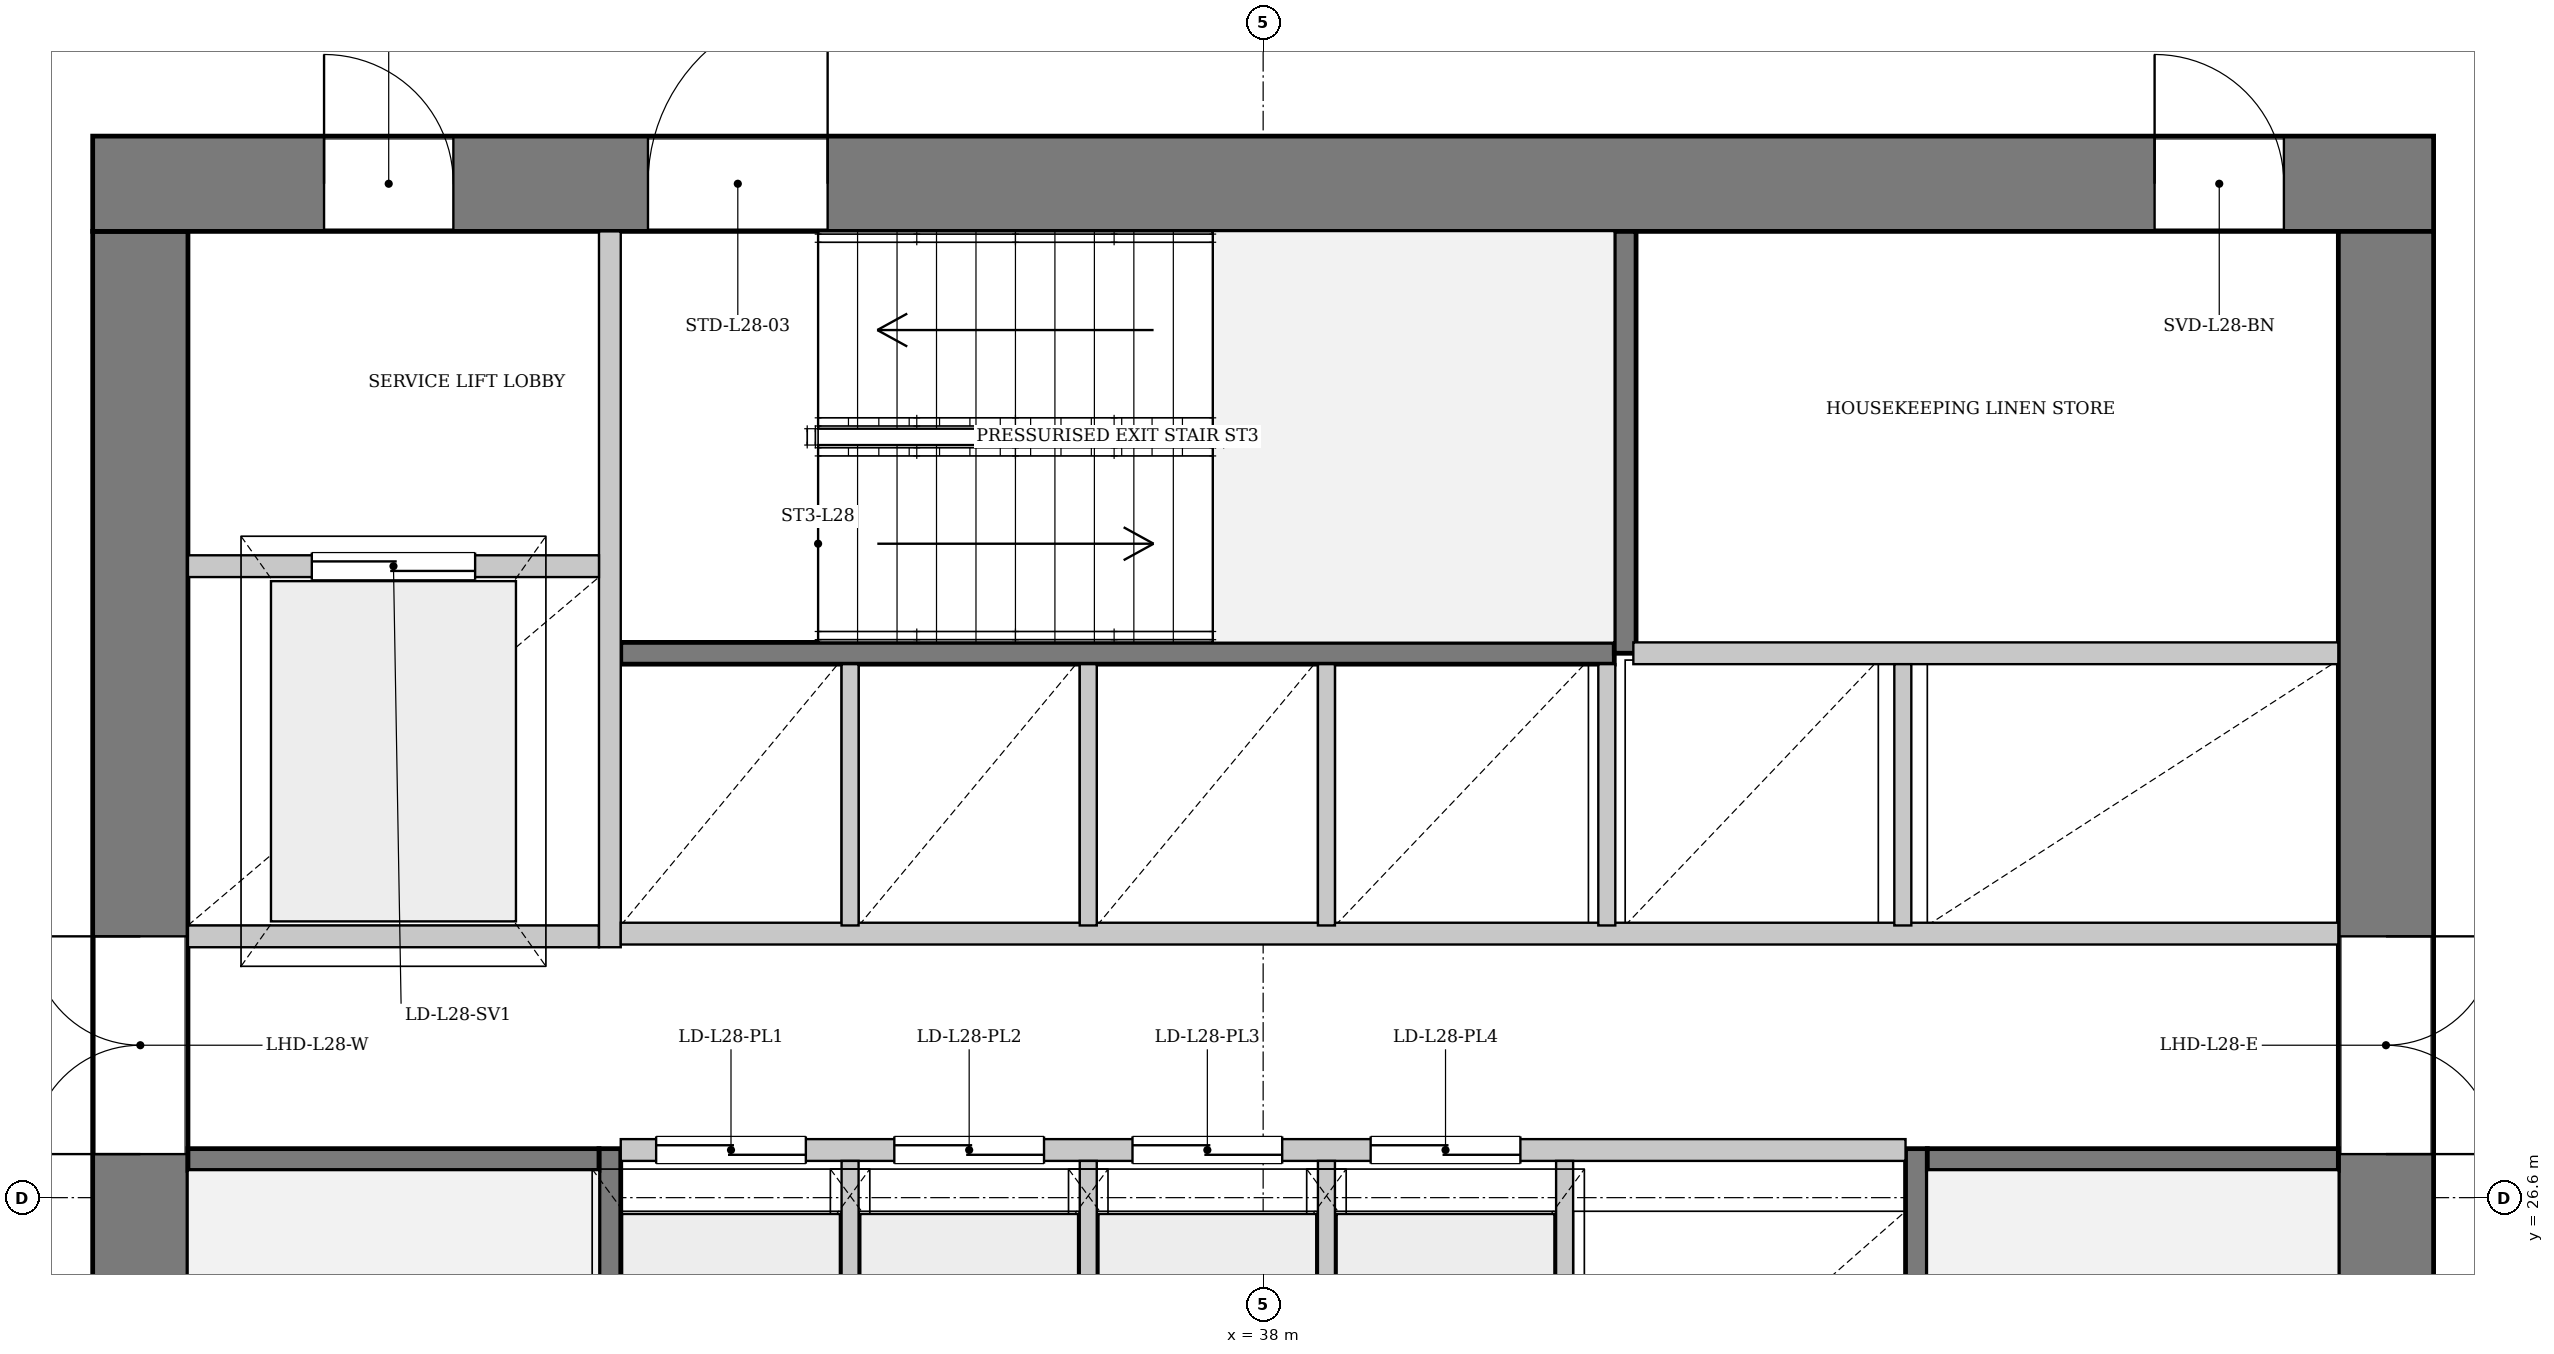
"""IFC4 building model, lengths in metres.
Left out: names, types, materials, properties, quantities, classifications, styles, units other than length and angle.
Written with IfcOpenShell. Run it as: python <this file> out.ifc"""

import sys

from ifc_helpers import new_model, si_unit, direction, frame, frame_2d, origin, place, context, subcontext, project, spatial, rectangle, extrude, source, transform, mapped, element, fill, save


model = new_model("IFC4")
c1 = context("Model", 3, precision=1e-05, world=origin(), true_north=direction((0.0, 1.0)))
c2 = subcontext(c1, "Body", "Model", "MODEL_VIEW")
j1 = project(units=[si_unit("LENGTHUNIT", "METRE"), si_unit("PLANEANGLEUNIT", "RADIAN")], contexts=[c1])
p1 = place(None, origin())
s1 = spatial("IfcSite", under=j1, at=p1, CompositionType="ELEMENT")
p2 = place(p1, origin())
s2 = spatial("IfcBuilding", under=s1, at=p2, CompositionType="ELEMENT")
p3 = place(p2, frame((0.0, 0.0, 109.25)))
s3 = spatial("IfcBuildingStorey", under=s2, at=p3, CompositionType="ELEMENT", Elevation=109.25)
p4 = place(p3, frame((29.75, 19.5, 0.0), z_axis=(0.0, 0.0, 1.0), x_axis=(0.0, 1.0, 0.0)))
e1 = element("IfcWall", 1, at=p4, inside=s3, PredefinedType="SHEAR", context=c2, shape_type="SweptSolid", body=[
    extrude(rectangle(XDim=14.2, YDim=0.7, at=frame_2d((7.1, 0.0))), origin(), (0.0, 0.0, 1.0), 3.3),
])
p5 = place(p4, frame((7.42, 0.0, 0.0)))
e2 = element("IfcOpeningElement", 2, at=p5, cuts=e1, PredefinedType="OPENING", context=c2, shape_type="SweptSolid", body=[
    extrude(rectangle(XDim=1.6, YDim=2.2, at=frame_2d((0.8, 1.1))), frame((0.0, 0.36, 0.0), z_axis=(0.0, -1.0, 0.0), x_axis=(1.0, 0.0, 0.0)), (0.0, 0.0, 1.0), 0.72),
])
p6 = place(p3, frame((29.4, 34.05, 0.0), z_axis=(0.0, 0.0, 1.0), x_axis=(1.0, 0.0, 0.0)))
e3 = element("IfcWall", 3, at=p6, inside=s3, PredefinedType="SHEAR", context=c2, shape_type="SweptSolid", body=[
    extrude(rectangle(XDim=17.2, YDim=0.7, at=frame_2d((8.6, 0.0))), origin(), (0.0, 0.0, 1.0), 3.3),
])
p7 = place(p6, frame((1.7, 0.0, 0.0)))
e4 = element("IfcOpeningElement", 4, at=p7, cuts=e3, PredefinedType="OPENING", context=c2, shape_type="SweptSolid", body=[
    extrude(rectangle(XDim=0.95, YDim=2.1, at=frame_2d((0.475, 1.05))), frame((0.0, 0.36, 0.0), z_axis=(0.0, -1.0, 0.0), x_axis=(1.0, 0.0, 0.0)), (0.0, 0.0, 1.0), 0.72),
])
p8 = place(p6, frame((4.08, 0.0, 0.0)))
e5 = element("IfcOpeningElement", 5, at=p8, cuts=e3, PredefinedType="OPENING", context=c2, shape_type="SweptSolid", body=[
    extrude(rectangle(XDim=1.32, YDim=2.2, at=frame_2d((0.66, 1.1))), frame((0.0, 0.36, 0.0), z_axis=(0.0, -1.0, 0.0), x_axis=(1.0, 0.0, 0.0)), (0.0, 0.0, 1.0), 0.72),
])
p9 = place(p6, frame((15.15, 0.0, 0.0)))
e6 = element("IfcOpeningElement", 6, at=p9, cuts=e3, PredefinedType="OPENING", context=c2, shape_type="SweptSolid", body=[
    extrude(rectangle(XDim=0.95, YDim=2.1, at=frame_2d((0.475, 1.05))), frame((0.0, 0.36, 0.0), z_axis=(0.0, -1.0, 0.0), x_axis=(1.0, 0.0, 0.0)), (0.0, 0.0, 1.0), 0.72),
])
p10 = place(p3, frame((46.25, 33.7, 0.0), z_axis=(0.0, 0.0, 1.0), x_axis=(0.0, -1.0, 0.0)))
e7 = element("IfcWall", 7, at=p10, inside=s3, PredefinedType="SHEAR", context=c2, shape_type="SweptSolid", body=[
    extrude(rectangle(XDim=14.2, YDim=0.7, at=frame_2d((7.1, 0.0))), origin(), (0.0, 0.0, 1.0), 3.3),
])
p11 = place(p10, frame((5.18, 0.0, 0.0)))
e8 = element("IfcOpeningElement", 8, at=p11, cuts=e7, PredefinedType="OPENING", context=c2, shape_type="SweptSolid", body=[
    extrude(rectangle(XDim=1.6, YDim=2.2, at=frame_2d((0.8, 1.1))), frame((0.0, 0.36, 0.0), z_axis=(0.0, -1.0, 0.0), x_axis=(1.0, 0.0, 0.0)), (0.0, 0.0, 1.0), 0.72),
])
p12 = place(p3, frame((33.2, 19.5, 0.0), z_axis=(0.0, 0.0, 1.0), x_axis=(0.0, 1.0, 0.0)))
e9 = element("IfcWall", 9, at=p12, inside=s3, PredefinedType="PARTITIONING", context=c2, shape_type="SweptSolid", body=[
    extrude(rectangle(XDim=7.46, YDim=0.16, at=frame_2d((3.73, 0.0))), origin(), (0.0, 0.0, 1.0), 3.3),
])
p13 = place(p12, frame((0.08, 0.0, 0.0)))
e10 = element("IfcOpeningElement", 10, at=p13, cuts=e9, PredefinedType="OPENING", context=c2, shape_type="SweptSolid", body=[
    extrude(rectangle(XDim=1.32, YDim=2.2, at=frame_2d((0.66, 1.1))), frame((0.0, 0.09, 0.0), z_axis=(0.0, -1.0, 0.0), x_axis=(1.0, 0.0, 0.0)), (0.0, 0.0, 1.0), 0.18),
])
p14 = place(p3, frame((30.1, 26.88, 0.0), z_axis=(0.0, 0.0, 1.0), x_axis=(1.0, 0.0, 0.0)))
e11 = element("IfcWall", 11, at=p14, inside=s3, PredefinedType="PARTITIONING", context=c2, shape_type="SweptSolid", body=[
    extrude(rectangle(XDim=3.02, YDim=0.16, at=frame_2d((1.51, 0.0))), origin(), (0.0, 0.0, 1.0), 3.3),
])
p15 = place(p3, frame((42.8, 26.96, 0.0), z_axis=(0.0, 0.0, 1.0), x_axis=(0.0, -1.0, 0.0)))
e12 = element("IfcWall", 12, at=p15, inside=s3, PredefinedType="PARTITIONING", context=c2, shape_type="SweptSolid", body=[
    extrude(rectangle(XDim=7.46, YDim=0.16, at=frame_2d((3.73, 0.0))), origin(), (0.0, 0.0, 1.0), 3.3),
])
p16 = place(p15, frame((6.06, 0.0, 0.0)))
e13 = element("IfcOpeningElement", 13, at=p16, cuts=e12, PredefinedType="OPENING", context=c2, shape_type="SweptSolid", body=[
    extrude(rectangle(XDim=1.32, YDim=2.2, at=frame_2d((0.66, 1.1))), frame((0.0, 0.09, 0.0), z_axis=(0.0, -1.0, 0.0), x_axis=(1.0, 0.0, 0.0)), (0.0, 0.0, 1.0), 0.18),
])
p17 = place(p3, frame((42.88, 26.88, 0.0), z_axis=(0.0, 0.0, 1.0), x_axis=(1.0, 0.0, 0.0)))
e14 = element("IfcWall", 14, at=p17, inside=s3, PredefinedType="PARTITIONING", context=c2, shape_type="SweptSolid", body=[
    extrude(rectangle(XDim=3.02, YDim=0.16, at=frame_2d((1.51, 0.0))), origin(), (0.0, 0.0, 1.0), 3.3),
])
p18 = place(p3, frame((33.28, 30.6, 0.0), z_axis=(0.0, 0.0, 1.0), x_axis=(1.0, 0.0, 0.0)))
e15 = element("IfcWall", 15, at=p18, inside=s3, PredefinedType="PARTITIONING", context=c2, shape_type="SweptSolid", body=[
    extrude(rectangle(XDim=7.3, YDim=0.16, at=frame_2d((3.65, 0.0))), origin(), (0.0, 0.0, 1.0), 3.3),
])
p19 = place(p3, frame((40.66, 30.6, 0.0), z_axis=(0.0, 0.0, 1.0), x_axis=(0.0, 1.0, 0.0)))
e16 = element("IfcWall", 16, at=p19, inside=s3, PredefinedType="PARTITIONING", context=c2, shape_type="SweptSolid", body=[
    extrude(rectangle(XDim=3.1, YDim=0.16, at=frame_2d((1.55, 0.0))), origin(), (0.0, 0.0, 1.0), 3.3),
])
p20 = place(p3, frame((30.1, 28.52, 0.0), z_axis=(0.0, 0.0, 1.0), x_axis=(1.0, 0.0, 0.0)))
e17 = element("IfcWall", 17, at=p20, inside=s3, PredefinedType="PARTITIONING", context=c2, shape_type="SweptSolid", body=[
    extrude(rectangle(XDim=3.02, YDim=0.16, at=frame_2d((1.51, 0.0))), origin(), (0.0, 0.0, 1.0), 3.3),
])
p21 = place(p3, frame((33.2, 28.44, 0.0), z_axis=(0.0, 0.0, 1.0), x_axis=(0.0, 1.0, 0.0)))
e18 = element("IfcWall", 18, at=p21, inside=s3, PredefinedType="PARTITIONING", context=c2, shape_type="SweptSolid", body=[
    extrude(rectangle(XDim=5.26, YDim=0.16, at=frame_2d((2.63, 0.0))), origin(), (0.0, 0.0, 1.0), 3.3),
])
p22 = place(p3, frame((30.1, 31.24, 0.0), z_axis=(0.0, 0.0, 1.0), x_axis=(1.0, 0.0, 0.0)))
e19 = element("IfcWall", 19, at=p22, inside=s3, PredefinedType="PARTITIONING", context=c2, shape_type="SweptSolid", body=[
    extrude(rectangle(XDim=3.02, YDim=0.16, at=frame_2d((1.51, 0.0))), origin(), (0.0, 0.0, 1.0), 3.3),
])
p23 = place(p22, frame((0.91, 0.0, 0.0)))
e20 = element("IfcOpeningElement", 20, at=p23, cuts=e19, PredefinedType="OPENING", context=c2, shape_type="SweptSolid", body=[
    extrude(rectangle(XDim=1.2, YDim=2.2, at=frame_2d((0.6, 1.1))), frame((0.0, 0.09, 0.0), z_axis=(0.0, -1.0, 0.0), x_axis=(1.0, 0.0, 0.0)), (0.0, 0.0, 1.0), 0.18),
])
p24 = place(p3, frame((33.28, 26.95, 0.0), z_axis=(0.0, 0.0, 1.0), x_axis=(1.0, 0.0, 0.0)))
e21 = element("IfcWall", 21, at=p24, inside=s3, PredefinedType="PARTITIONING", context=c2, shape_type="SweptSolid", body=[
    extrude(rectangle(XDim=9.44, YDim=0.16, at=frame_2d((4.72, 0.0))), origin(), (0.0, 0.0, 1.0), 3.3),
])
p25 = place(p24, frame((0.26, 0.0, 0.0)))
e22 = element("IfcOpeningElement", 22, at=p25, cuts=e21, PredefinedType="OPENING", context=c2, shape_type="SweptSolid", body=[
    extrude(rectangle(XDim=1.1, YDim=2.2, at=frame_2d((0.55, 1.1))), frame((0.0, 0.09, 0.0), z_axis=(0.0, -1.0, 0.0), x_axis=(1.0, 0.0, 0.0)), (0.0, 0.0, 1.0), 0.18),
])
p26 = place(p24, frame((2.01, 0.0, 0.0)))
e23 = element("IfcOpeningElement", 23, at=p26, cuts=e21, PredefinedType="OPENING", context=c2, shape_type="SweptSolid", body=[
    extrude(rectangle(XDim=1.1, YDim=2.2, at=frame_2d((0.55, 1.1))), frame((0.0, 0.09, 0.0), z_axis=(0.0, -1.0, 0.0), x_axis=(1.0, 0.0, 0.0)), (0.0, 0.0, 1.0), 0.18),
])
p27 = place(p24, frame((3.76, 0.0, 0.0)))
e24 = element("IfcOpeningElement", 24, at=p27, cuts=e21, PredefinedType="OPENING", context=c2, shape_type="SweptSolid", body=[
    extrude(rectangle(XDim=1.1, YDim=2.2, at=frame_2d((0.55, 1.1))), frame((0.0, 0.09, 0.0), z_axis=(0.0, -1.0, 0.0), x_axis=(1.0, 0.0, 0.0)), (0.0, 0.0, 1.0), 0.18),
])
p28 = place(p24, frame((5.51, 0.0, 0.0)))
e25 = element("IfcOpeningElement", 25, at=p28, cuts=e21, PredefinedType="OPENING", context=c2, shape_type="SweptSolid", body=[
    extrude(rectangle(XDim=1.1, YDim=2.2, at=frame_2d((0.55, 1.1))), frame((0.0, 0.09, 0.0), z_axis=(0.0, -1.0, 0.0), x_axis=(1.0, 0.0, 0.0)), (0.0, 0.0, 1.0), 0.18),
])
for number, where, z_axis, x_axis in (
    (26, (34.965, 24.56, 0.0), (0.0, 0.0, 1.0), (0.0, 1.0, 0.0)),
    (27, (36.715, 24.56, 0.0), (0.0, 0.0, 1.0), (0.0, 1.0, 0.0)),
    (28, (38.465, 24.56, 0.0), (0.0, 0.0, 1.0), (0.0, 1.0, 0.0)),
    (29, (40.215, 24.56, 0.0), (0.0, 0.0, 1.0), (0.0, 1.0, 0.0)),
):
    element("IfcWall", number, at=place(p3, frame(where, z_axis=z_axis, x_axis=x_axis)), inside=s3, PredefinedType="PARTITIONING", context=c2, shape_type="SweptSolid", body=[
        extrude(rectangle(XDim=2.31, YDim=0.125, at=frame_2d((1.155, 0.0))), origin(), (0.0, 0.0, 1.0), 3.3),
    ])
p29 = place(p3, frame((33.28, 28.54, 0.0), z_axis=(0.0, 0.0, 1.0), x_axis=(1.0, 0.0, 0.0)))
e30 = element("IfcWall", 30, at=p29, inside=s3, PredefinedType="PARTITIONING", context=c2, shape_type="SweptSolid", body=[
    extrude(rectangle(XDim=12.62, YDim=0.16, at=frame_2d((6.31, 0.0))), origin(), (0.0, 0.0, 1.0), 3.3),
])
p30 = place(p3, frame((40.72, 30.6, 0.0), z_axis=(0.0, 0.0, 1.0), x_axis=(1.0, 0.0, 0.0)))
e31 = element("IfcWall", 31, at=p30, inside=s3, PredefinedType="PARTITIONING", context=c2, shape_type="SweptSolid", body=[
    extrude(rectangle(XDim=5.18, YDim=0.16, at=frame_2d((2.59, 0.0))), origin(), (0.0, 0.0, 1.0), 3.3),
])
for number, where, z_axis, x_axis in (
    (32, (34.965, 28.6, 0.0), (0.0, 0.0, 1.0), (0.0, 1.0, 0.0)),
    (33, (36.715, 28.6, 0.0), (0.0, 0.0, 1.0), (0.0, 1.0, 0.0)),
    (34, (38.465, 28.6, 0.0), (0.0, 0.0, 1.0), (0.0, 1.0, 0.0)),
    (35, (40.525, 28.6, 0.0), (0.0, 0.0, 1.0), (0.0, 1.0, 0.0)),
    (36, (42.7, 28.6, 0.0), (0.0, 0.0, 1.0), (0.0, 1.0, 0.0)),
):
    element("IfcWall", number, at=place(p3, frame(where, z_axis=z_axis, x_axis=x_axis)), inside=s3, PredefinedType="PARTITIONING", context=c2, shape_type="SweptSolid", body=[
        extrude(rectangle(XDim=1.92, YDim=0.125, at=frame_2d((0.96, 0.0))), origin(), (0.0, 0.0, 1.0), 3.3),
    ])
m1 = source(origin(), c2, "Body", "SweptSolid", [
    extrude(rectangle(XDim=1.6, YDim=2.2, at=frame_2d((0.8, 1.1))), frame((0.0, 0.025, 0.0), z_axis=(0.0, -1.0, 0.0), x_axis=(1.0, 0.0, 0.0)), (0.0, 0.0, 1.0), 0.05),
])
p31 = place(p5, origin())
e37 = element("IfcDoor", 37, at=p31, inside=s3, OperationType="DOUBLE_DOOR_SINGLE_SWING", PredefinedType="DOOR", context=c2, shape_type="MappedRepresentation", body=[
    mapped(m1, transform((0.0, 0.0, 0.0), x_axis=(1.0, 0.0, 0.0), y_axis=(0.0, 1.0, 0.0), z_axis=(0.0, 0.0, 1.0), scale=1.0)),
])
fill(e2, e37)
m2 = source(origin(), c2, "Body", "SweptSolid", [
    extrude(rectangle(XDim=0.95, YDim=2.1, at=frame_2d((0.475, 1.05))), frame((0.0, 0.025, 0.0), z_axis=(0.0, -1.0, 0.0), x_axis=(1.0, 0.0, 0.0)), (0.0, 0.0, 1.0), 0.05),
])
p32 = place(p7, origin())
e38 = element("IfcDoor", 38, at=p32, inside=s3, OperationType="SINGLE_SWING_LEFT", PredefinedType="DOOR", context=c2, shape_type="MappedRepresentation", body=[
    mapped(m2, transform((0.0, 0.0, 0.0), x_axis=(1.0, 0.0, 0.0), y_axis=(0.0, 1.0, 0.0), z_axis=(0.0, 0.0, 1.0), scale=1.0)),
])
fill(e4, e38)
m3 = source(origin(), c2, "Body", "SweptSolid", [
    extrude(rectangle(XDim=1.32, YDim=2.2, at=frame_2d((0.66, 1.1))), frame((0.0, 0.025, 0.0), z_axis=(0.0, -1.0, 0.0), x_axis=(1.0, 0.0, 0.0)), (0.0, 0.0, 1.0), 0.05),
])
p33 = place(p8, origin())
e39 = element("IfcDoor", 39, at=p33, inside=s3, OperationType="SINGLE_SWING_RIGHT", PredefinedType="DOOR", context=c2, shape_type="MappedRepresentation", body=[
    mapped(m3, transform((0.0, 0.0, 0.0), x_axis=(1.0, 0.0, 0.0), y_axis=(0.0, 1.0, 0.0), z_axis=(0.0, 0.0, 1.0), scale=1.0)),
])
fill(e5, e39)
p34 = place(p11, origin())
e40 = element("IfcDoor", 40, at=p34, inside=s3, OperationType="DOUBLE_DOOR_SINGLE_SWING", PredefinedType="DOOR", context=c2, shape_type="MappedRepresentation", body=[
    mapped(m1, transform((0.0, 0.0, 0.0), x_axis=(1.0, 0.0, 0.0), y_axis=(0.0, 1.0, 0.0), z_axis=(0.0, 0.0, 1.0), scale=1.0)),
])
fill(e8, e40)
m4 = source(origin(), c2, "Body", "SweptSolid", [
    extrude(rectangle(XDim=1.2, YDim=2.2, at=frame_2d((0.6, 1.1))), frame((0.0, 0.025, 0.0), z_axis=(0.0, -1.0, 0.0), x_axis=(1.0, 0.0, 0.0)), (0.0, 0.0, 1.0), 0.05),
])
p35 = place(p23, origin())
e41 = element("IfcDoor", 41, at=p35, inside=s3, OperationType="DOUBLE_DOOR_SLIDING", PredefinedType="DOOR", context=c2, shape_type="MappedRepresentation", body=[
    mapped(m4, transform((0.0, 0.0, 0.0), x_axis=(1.0, 0.0, 0.0), y_axis=(0.0, 1.0, 0.0), z_axis=(0.0, 0.0, 1.0), scale=1.0)),
])
fill(e20, e41)
m5 = source(origin(), c2, "Body", "SweptSolid", [
    extrude(rectangle(XDim=1.1, YDim=2.2, at=frame_2d((0.55, 1.1))), frame((0.0, 0.025, 0.0), z_axis=(0.0, -1.0, 0.0), x_axis=(1.0, 0.0, 0.0)), (0.0, 0.0, 1.0), 0.05),
])
p36 = place(p25, origin())
e42 = element("IfcDoor", 42, at=p36, inside=s3, OperationType="DOUBLE_DOOR_SLIDING", PredefinedType="DOOR", context=c2, shape_type="MappedRepresentation", body=[
    mapped(m5, transform((0.0, 0.0, 0.0), x_axis=(1.0, 0.0, 0.0), y_axis=(0.0, 1.0, 0.0), z_axis=(0.0, 0.0, 1.0), scale=1.0)),
])
fill(e22, e42)
p37 = place(p26, origin())
e43 = element("IfcDoor", 43, at=p37, inside=s3, OperationType="DOUBLE_DOOR_SLIDING", PredefinedType="DOOR", context=c2, shape_type="MappedRepresentation", body=[
    mapped(m5, transform((0.0, 0.0, 0.0), x_axis=(1.0, 0.0, 0.0), y_axis=(0.0, 1.0, 0.0), z_axis=(0.0, 0.0, 1.0), scale=1.0)),
])
fill(e23, e43)
p38 = place(p27, origin())
e44 = element("IfcDoor", 44, at=p38, inside=s3, OperationType="DOUBLE_DOOR_SLIDING", PredefinedType="DOOR", context=c2, shape_type="MappedRepresentation", body=[
    mapped(m5, transform((0.0, 0.0, 0.0), x_axis=(1.0, 0.0, 0.0), y_axis=(0.0, 1.0, 0.0), z_axis=(0.0, 0.0, 1.0), scale=1.0)),
])
fill(e24, e44)
p39 = place(p28, origin())
e45 = element("IfcDoor", 45, at=p39, inside=s3, OperationType="DOUBLE_DOOR_SLIDING", PredefinedType="DOOR", context=c2, shape_type="MappedRepresentation", body=[
    mapped(m5, transform((0.0, 0.0, 0.0), x_axis=(1.0, 0.0, 0.0), y_axis=(0.0, 1.0, 0.0), z_axis=(0.0, 0.0, 1.0), scale=1.0)),
])
fill(e25, e45)
p40 = place(p9, origin())
e46 = element("IfcDoor", 46, at=p40, inside=s3, OperationType="SINGLE_SWING_LEFT", PredefinedType="DOOR", context=c2, shape_type="MappedRepresentation", body=[
    mapped(m2, transform((0.0, 0.0, 0.0), x_axis=(1.0, 0.0, 0.0), y_axis=(0.0, 1.0, 0.0), z_axis=(0.0, 0.0, 1.0), scale=1.0)),
])
fill(e6, e46)
save(model, sys.argv[1])
